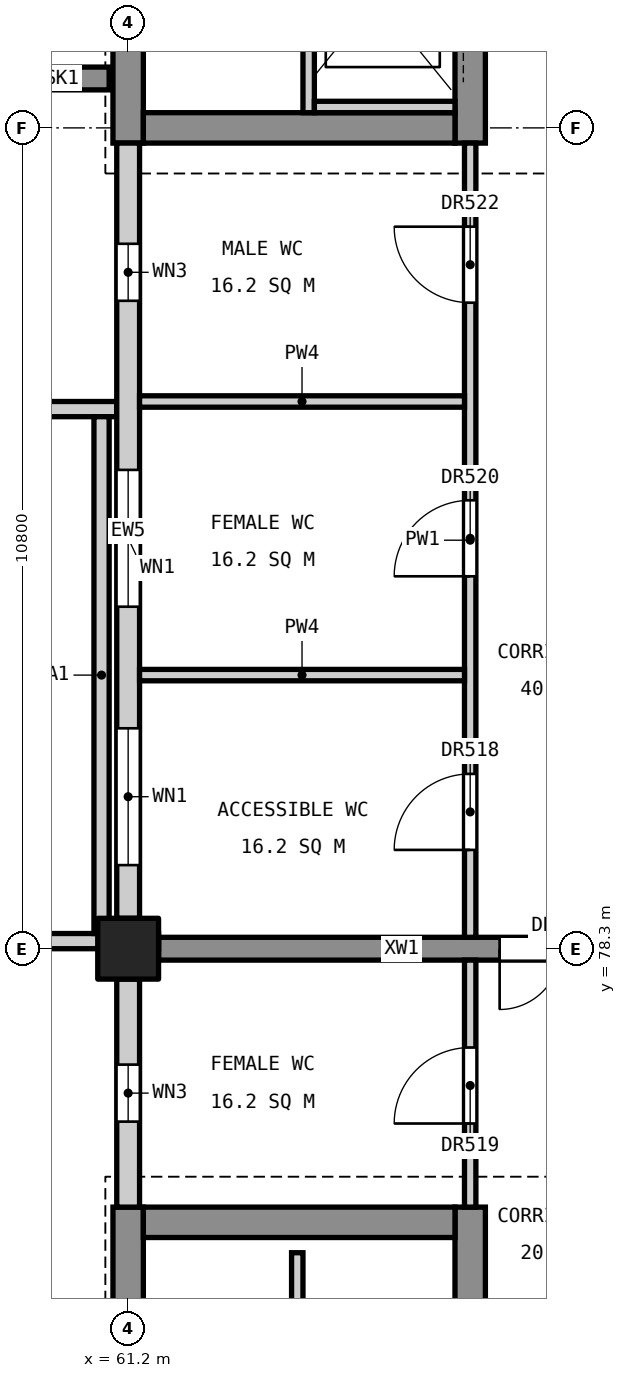
"""IFC4 building model, lengths in metres.
Left out: names, types, materials, properties, quantities, classifications, styles, units other than length and angle.
Written with IfcOpenShell. Run it as: python <this file> out.ifc"""

import sys

from ifc_helpers import new_model, si_unit, direction, frame, frame_2d, origin, origin_2d, place, context, subcontext, project, spatial, rectangle, extrude, element, fill, save


model = new_model("IFC4")
c1 = context("Model", 3, precision=1e-05, world=origin(), true_north=direction((0.0, 1.0)))
c2 = subcontext(c1, "Body", "Model", "MODEL_VIEW")
j1 = project(units=[si_unit("LENGTHUNIT", "METRE"), si_unit("PLANEANGLEUNIT", "RADIAN")], contexts=[c1])
p1 = place(None, origin())
s1 = spatial("IfcSite", under=j1, at=p1, CompositionType="ELEMENT")
p2 = place(p1, origin())
s2 = spatial("IfcBuilding", under=s1, at=p2, CompositionType="ELEMENT")
p3 = place(p2, frame((0.0, 0.0, 70.2)))
s3 = spatial("IfcBuildingStorey", under=s2, at=p3, CompositionType="ELEMENT", Elevation=70.2)
p4 = place(p3, frame((61.2, 78.3, 0.0), z_axis=(0.0, 0.0, 1.0), x_axis=(1.0, 0.0, 0.0)))
e1 = element("IfcColumn", 1, at=p4, inside=s3, PredefinedType="COLUMN", context=c2, shape_type="SweptSolid", body=[
    extrude(rectangle(XDim=0.8, YDim=0.8, at=origin_2d()), origin(), (0.0, 0.0, 1.0), 4.8),
])
p5 = place(p3, frame((61.2, 60.1, 0.0), z_axis=(0.0, 0.0, 1.0), x_axis=(0.0, 1.0, 0.0)))
e2 = element("IfcWall", 2, at=p5, inside=s3, PredefinedType="SHEAR", context=c2, shape_type="SweptSolid", body=[
    extrude(rectangle(XDim=14.8, YDim=0.4, at=frame_2d((7.4, 0.0))), origin(), (0.0, 0.0, 1.0), 4.55),
])
p6 = place(p5, frame((6.11, 0.0, 3.4)))
e3 = element("IfcOpeningElement", 3, at=p6, cuts=e2, PredefinedType="OPENING", context=c2, shape_type="SweptSolid", body=[
    extrude(rectangle(XDim=1.2, YDim=0.9, at=frame_2d((0.6, 0.45))), frame((0.0, 0.21, 0.0), z_axis=(0.0, -1.0, 0.0), x_axis=(1.0, 0.0, 0.0)), (0.0, 0.0, 1.0), 0.42),
])
p7 = place(p3, frame((65.7, 60.1, 0.0), z_axis=(0.0, 0.0, 1.0), x_axis=(0.0, 1.0, 0.0)))
e4 = element("IfcWall", 4, at=p7, inside=s3, PredefinedType="SHEAR", context=c2, shape_type="SweptSolid", body=[
    extrude(rectangle(XDim=14.8, YDim=0.4, at=frame_2d((7.4, 0.0))), origin(), (0.0, 0.0, 1.0), 4.55),
])
p8 = place(p7, frame((0.5, 0.0, 0.0)))
e5 = element("IfcOpeningElement", 5, at=p8, cuts=e4, PredefinedType="OPENING", context=c2, shape_type="SweptSolid", body=[
    extrude(rectangle(XDim=1.4, YDim=2.1, at=frame_2d((0.7, 1.05))), frame((0.0, 0.21, 0.0), z_axis=(0.0, -1.0, 0.0), x_axis=(1.0, 0.0, 0.0)), (0.0, 0.0, 1.0), 0.42),
])
p9 = place(p7, frame((8.8, 0.0, 0.0)))
e6 = element("IfcOpeningElement", 6, at=p9, cuts=e4, PredefinedType="OPENING", context=c2, shape_type="SweptSolid", body=[
    extrude(rectangle(XDim=1.1, YDim=2.1, at=frame_2d((0.55, 1.05))), frame((0.0, 0.21, 0.0), z_axis=(0.0, -1.0, 0.0), x_axis=(1.0, 0.0, 0.0)), (0.0, 0.0, 1.0), 0.42),
])
p10 = place(p7, frame((11.35, 0.0, 0.0)))
e7 = element("IfcOpeningElement", 7, at=p10, cuts=e4, PredefinedType="OPENING", context=c2, shape_type="SweptSolid", body=[
    extrude(rectangle(XDim=1.1, YDim=2.1, at=frame_2d((0.55, 1.05))), frame((0.0, 0.21, 0.0), z_axis=(0.0, -1.0, 0.0), x_axis=(1.0, 0.0, 0.0)), (0.0, 0.0, 1.0), 0.42),
])
p11 = place(p3, frame((61.4, 74.7, 0.0), z_axis=(0.0, 0.0, 1.0), x_axis=(1.0, 0.0, 0.0)))
e8 = element("IfcWall", 8, at=p11, inside=s3, PredefinedType="SHEAR", context=c2, shape_type="SweptSolid", body=[
    extrude(rectangle(XDim=4.1, YDim=0.4, at=frame_2d((2.05, 0.0))), origin(), (0.0, 0.0, 1.0), 4.55),
])
p12 = place(p3, frame((61.2, 88.9, 0.0), z_axis=(0.0, 0.0, 1.0), x_axis=(0.0, 1.0, 0.0)))
e9 = element("IfcWall", 9, at=p12, inside=s3, PredefinedType="SHEAR", context=c2, shape_type="SweptSolid", body=[
    extrude(rectangle(XDim=11.2, YDim=0.4, at=frame_2d((5.6, 0.0))), origin(), (0.0, 0.0, 1.0), 4.55),
])
p13 = place(p12, frame((3.89, 0.0, 3.4)))
e10 = element("IfcOpeningElement", 10, at=p13, cuts=e9, PredefinedType="OPENING", context=c2, shape_type="SweptSolid", body=[
    extrude(rectangle(XDim=1.2, YDim=0.9, at=frame_2d((0.6, 0.45))), frame((0.0, 0.21, 0.0), z_axis=(0.0, -1.0, 0.0), x_axis=(1.0, 0.0, 0.0)), (0.0, 0.0, 1.0), 0.42),
])
p14 = place(p3, frame((65.7, 88.9, 0.0), z_axis=(0.0, 0.0, 1.0), x_axis=(0.0, 1.0, 0.0)))
e11 = element("IfcWall", 11, at=p14, inside=s3, PredefinedType="SHEAR", context=c2, shape_type="SweptSolid", body=[
    extrude(rectangle(XDim=11.2, YDim=0.4, at=frame_2d((5.6, 0.0))), origin(), (0.0, 0.0, 1.0), 4.55),
])
p15 = place(p14, frame((9.3, 0.0, 0.0)))
e12 = element("IfcOpeningElement", 12, at=p15, cuts=e11, PredefinedType="OPENING", context=c2, shape_type="SweptSolid", body=[
    extrude(rectangle(XDim=1.4, YDim=2.1, at=frame_2d((0.7, 1.05))), frame((0.0, 0.21, 0.0), z_axis=(0.0, -1.0, 0.0), x_axis=(1.0, 0.0, 0.0)), (0.0, 0.0, 1.0), 0.42),
])
p16 = place(p14, frame((1.35, 0.0, 0.0)))
e13 = element("IfcOpeningElement", 13, at=p16, cuts=e11, PredefinedType="OPENING", context=c2, shape_type="SweptSolid", body=[
    extrude(rectangle(XDim=1.1, YDim=2.1, at=frame_2d((0.55, 1.05))), frame((0.0, 0.21, 0.0), z_axis=(0.0, -1.0, 0.0), x_axis=(1.0, 0.0, 0.0)), (0.0, 0.0, 1.0), 0.42),
])
p17 = place(p3, frame((61.4, 89.1, 0.0), z_axis=(0.0, 0.0, 1.0), x_axis=(1.0, 0.0, 0.0)))
e14 = element("IfcWall", 14, at=p17, inside=s3, PredefinedType="SHEAR", context=c2, shape_type="SweptSolid", body=[
    extrude(rectangle(XDim=4.1, YDim=0.4, at=frame_2d((2.05, 0.0))), origin(), (0.0, 0.0, 1.0), 4.55),
])
p18 = place(p3, frame((60.95, 89.75, 0.0), z_axis=(0.0, 0.0, 1.0), x_axis=(-1.0, 0.0, 0.0)))
e15 = element("IfcWall", 15, at=p18, inside=s3, PredefinedType="SHEAR", context=c2, shape_type="SweptSolid", body=[
    extrude(rectangle(XDim=1.25, YDim=0.3, at=frame_2d((0.625, 0.0))), origin(), (0.0, 0.0, 1.0), 4.8),
])
p19 = place(p3, frame((61.6, 78.3, 0.0), z_axis=(0.0, 0.0, 1.0), x_axis=(1.0, 0.0, 0.0)))
e16 = element("IfcWall", 16, at=p19, inside=s3, PredefinedType="SHEAR", context=c2, shape_type="SweptSolid", body=[
    extrude(rectangle(XDim=6.4, YDim=0.3, at=frame_2d((3.2, 0.0))), origin(), (0.0, 0.0, 1.0), 4.55),
])
p20 = place(p19, frame((4.488, 0.0, 0.0)))
e17 = element("IfcOpeningElement", 17, at=p20, cuts=e16, PredefinedType="OPENING", context=c2, shape_type="SweptSolid", body=[
    extrude(rectangle(XDim=1.6, YDim=2.1, at=frame_2d((0.8, 1.05))), frame((0.0, 0.16, 0.0), z_axis=(0.0, -1.0, 0.0), x_axis=(1.0, 0.0, 0.0)), (0.0, 0.0, 1.0), 0.32),
])
p21 = place(p3, frame((63.575, 92.0, 0.0), z_axis=(0.0, 0.0, 1.0), x_axis=(0.0, -1.0, 0.0)))
e18 = element("IfcWall", 18, at=p21, inside=s3, PredefinedType="SOLIDWALL", context=c2, shape_type="SweptSolid", body=[
    extrude(rectangle(XDim=2.7, YDim=0.15, at=frame_2d((1.35, 0.0))), origin(), (0.0, 0.0, 1.0), 4.55),
])
p22 = place(p3, frame((63.65, 89.375, 0.0), z_axis=(0.0, 0.0, 1.0), x_axis=(1.0, 0.0, 0.0)))
e19 = element("IfcWall", 19, at=p22, inside=s3, PredefinedType="SOLIDWALL", context=c2, shape_type="SweptSolid", body=[
    extrude(rectangle(XDim=1.85, YDim=0.15, at=frame_2d((0.925, 0.0))), origin(), (0.0, 0.0, 1.0), 4.55),
])
p23 = place(p3, frame((63.425, 73.3, 0.0), z_axis=(0.0, 0.0, 1.0), x_axis=(0.0, 1.0, 0.0)))
e20 = element("IfcWall", 20, at=p23, inside=s3, PredefinedType="SOLIDWALL", context=c2, shape_type="SweptSolid", body=[
    extrude(rectangle(XDim=1.0, YDim=0.15, at=frame_2d((0.5, 0.0))), origin(), (0.0, 0.0, 1.0), 4.55),
])
p24 = place(p3, frame((61.6, 78.4, 0.0), z_axis=(0.0, 0.0, 1.0), x_axis=(-1.0, 0.0, 0.0)))
e21 = element("IfcWall", 21, at=p24, inside=s3, PredefinedType="PARAPET", context=c2, shape_type="SweptSolid", body=[
    extrude(rectangle(XDim=5.2, YDim=0.2, at=frame_2d((2.6, 0.0))), origin(), (0.0, 0.0, 1.0), 1.2),
])
p25 = place(p3, frame((56.4, 85.4, 0.0), z_axis=(0.0, 0.0, 1.0), x_axis=(1.0, 0.0, 0.0)))
e22 = element("IfcWall", 22, at=p25, inside=s3, PredefinedType="PARAPET", context=c2, shape_type="SweptSolid", body=[
    extrude(rectangle(XDim=4.65, YDim=0.2, at=frame_2d((2.325, 0.0))), origin(), (0.0, 0.0, 1.0), 1.2),
])
p26 = place(p3, frame((60.85, 85.3, 0.0), z_axis=(0.0, 0.0, 1.0), x_axis=(0.0, -1.0, 0.0)))
e23 = element("IfcWall", 23, at=p26, inside=s3, PredefinedType="PARAPET", context=c2, shape_type="SweptSolid", body=[
    extrude(rectangle(XDim=6.8, YDim=0.2, at=frame_2d((3.4, 0.0))), origin(), (0.0, 0.0, 1.0), 1.2),
])
p27 = place(p3, frame((61.2, 74.9, 0.0), z_axis=(0.0, 0.0, 1.0), x_axis=(0.0, 1.0, 0.0)))
e24 = element("IfcWall", 24, at=p27, inside=s3, PredefinedType="STANDARD", context=c2, shape_type="SweptSolid", body=[
    extrude(rectangle(XDim=3.0, YDim=0.3, at=frame_2d((1.5, 0.0))), origin(), (0.0, 0.0, 1.0), 3.65),
])
p28 = place(p27, frame((1.125, 0.0, 0.8)))
e25 = element("IfcOpeningElement", 25, at=p28, cuts=e24, PredefinedType="OPENING", context=c2, shape_type="SweptSolid", body=[
    extrude(rectangle(XDim=0.75, YDim=1.2, at=frame_2d((0.375, 0.6))), frame((0.0, 0.16, 0.0), z_axis=(0.0, -1.0, 0.0), x_axis=(1.0, 0.0, 0.0)), (0.0, 0.0, 1.0), 0.32),
])
p29 = place(p3, frame((61.2, 78.7, 0.0), z_axis=(0.0, 0.0, 1.0), x_axis=(0.0, 1.0, 0.0)))
e26 = element("IfcWall", 26, at=p29, inside=s3, PredefinedType="STANDARD", context=c2, shape_type="SweptSolid", body=[
    extrude(rectangle(XDim=10.2, YDim=0.3, at=frame_2d((5.1, 0.0))), origin(), (0.0, 0.0, 1.0), 3.65),
])
p30 = place(p29, frame((0.7, 0.0, 0.9)))
e27 = element("IfcOpeningElement", 27, at=p30, cuts=e26, PredefinedType="OPENING", context=c2, shape_type="SweptSolid", body=[
    extrude(rectangle(XDim=1.8, YDim=2.4, at=frame_2d((0.9, 1.2))), frame((0.0, 0.16, 0.0), z_axis=(0.0, -1.0, 0.0), x_axis=(1.0, 0.0, 0.0)), (0.0, 0.0, 1.0), 0.32),
])
p31 = place(p29, frame((4.1, 0.0, 0.9)))
e28 = element("IfcOpeningElement", 28, at=p31, cuts=e26, PredefinedType="OPENING", context=c2, shape_type="SweptSolid", body=[
    extrude(rectangle(XDim=1.8, YDim=2.4, at=frame_2d((0.9, 1.2))), frame((0.0, 0.16, 0.0), z_axis=(0.0, -1.0, 0.0), x_axis=(1.0, 0.0, 0.0)), (0.0, 0.0, 1.0), 0.32),
])
p32 = place(p29, frame((8.125, 0.0, 0.8)))
e29 = element("IfcOpeningElement", 29, at=p32, cuts=e26, PredefinedType="OPENING", context=c2, shape_type="SweptSolid", body=[
    extrude(rectangle(XDim=0.75, YDim=1.2, at=frame_2d((0.375, 0.6))), frame((0.0, 0.16, 0.0), z_axis=(0.0, -1.0, 0.0), x_axis=(1.0, 0.0, 0.0)), (0.0, 0.0, 1.0), 0.32),
])
p33 = place(p3, frame((65.7, 74.9, 0.0), z_axis=(0.0, 0.0, 1.0), x_axis=(0.0, 1.0, 0.0)))
e30 = element("IfcWall", 30, at=p33, inside=s3, PredefinedType="PARTITIONING", context=c2, shape_type="SweptSolid", body=[
    extrude(rectangle(XDim=3.25, YDim=0.15, at=frame_2d((1.625, 0.0))), origin(), (0.0, 0.0, 1.0), 3.55),
])
p34 = place(p33, frame((1.1, 0.0, 0.0)))
e31 = element("IfcOpeningElement", 31, at=p34, cuts=e30, PredefinedType="OPENING", context=c2, shape_type="SweptSolid", body=[
    extrude(rectangle(XDim=1.0, YDim=2.1, at=frame_2d((0.5, 1.05))), frame((0.0, 0.085, 0.0), z_axis=(0.0, -1.0, 0.0), x_axis=(1.0, 0.0, 0.0)), (0.0, 0.0, 1.0), 0.17),
])
p35 = place(p3, frame((65.7, 78.45, 0.0), z_axis=(0.0, 0.0, 1.0), x_axis=(0.0, 1.0, 0.0)))
e32 = element("IfcWall", 32, at=p35, inside=s3, PredefinedType="PARTITIONING", context=c2, shape_type="SweptSolid", body=[
    extrude(rectangle(XDim=10.45, YDim=0.15, at=frame_2d((5.225, 0.0))), origin(), (0.0, 0.0, 1.0), 3.55),
])
p36 = place(p35, frame((1.15, 0.0, 0.0)))
e33 = element("IfcOpeningElement", 33, at=p36, cuts=e32, PredefinedType="OPENING", context=c2, shape_type="SweptSolid", body=[
    extrude(rectangle(XDim=1.0, YDim=2.1, at=frame_2d((0.5, 1.05))), frame((0.0, 0.085, 0.0), z_axis=(0.0, -1.0, 0.0), x_axis=(1.0, 0.0, 0.0)), (0.0, 0.0, 1.0), 0.17),
])
p37 = place(p35, frame((4.75, 0.0, 0.0)))
e34 = element("IfcOpeningElement", 34, at=p37, cuts=e32, PredefinedType="OPENING", context=c2, shape_type="SweptSolid", body=[
    extrude(rectangle(XDim=1.0, YDim=2.1, at=frame_2d((0.5, 1.05))), frame((0.0, 0.085, 0.0), z_axis=(0.0, -1.0, 0.0), x_axis=(1.0, 0.0, 0.0)), (0.0, 0.0, 1.0), 0.17),
])
p38 = place(p35, frame((8.35, 0.0, 0.0)))
e35 = element("IfcOpeningElement", 35, at=p38, cuts=e32, PredefinedType="OPENING", context=c2, shape_type="SweptSolid", body=[
    extrude(rectangle(XDim=1.0, YDim=2.1, at=frame_2d((0.5, 1.05))), frame((0.0, 0.085, 0.0), z_axis=(0.0, -1.0, 0.0), x_axis=(1.0, 0.0, 0.0)), (0.0, 0.0, 1.0), 0.17),
])
for number, where, z_axis, x_axis in (
    (36, (61.35, 81.9, 0.0), (0.0, 0.0, 1.0), (1.0, 0.0, 0.0)),
    (37, (61.35, 85.5, 0.0), (0.0, 0.0, 1.0), (1.0, 0.0, 0.0)),
):
    element("IfcWall", number, at=place(p3, frame(where, z_axis=z_axis, x_axis=x_axis)), inside=s3, PredefinedType="PARTITIONING", context=c2, shape_type="SweptSolid", body=[
        extrude(rectangle(XDim=4.275, YDim=0.15, at=frame_2d((2.137, 0.0))), origin(), (0.0, 0.0, 1.0), 3.85),
    ])
p39 = place(p28, origin())
e38 = element("IfcWindow", 38, at=p39, inside=s3, PartitioningType="SINGLE_PANEL", PredefinedType="WINDOW", context=c2, shape_type="SweptSolid", body=[
    extrude(rectangle(XDim=0.75, YDim=1.2, at=frame_2d((0.375, 0.6))), frame((0.0, 0.03, 0.0), z_axis=(0.0, -1.0, 0.0), x_axis=(1.0, 0.0, 0.0)), (0.0, 0.0, 1.0), 0.06),
])
fill(e25, e38)
p40 = place(p30, origin())
e39 = element("IfcWindow", 39, at=p40, inside=s3, PartitioningType="SINGLE_PANEL", PredefinedType="WINDOW", context=c2, shape_type="SweptSolid", body=[
    extrude(rectangle(XDim=1.8, YDim=2.4, at=frame_2d((0.9, 1.2))), frame((0.0, 0.03, 0.0), z_axis=(0.0, -1.0, 0.0), x_axis=(1.0, 0.0, 0.0)), (0.0, 0.0, 1.0), 0.06),
])
fill(e27, e39)
p41 = place(p31, origin())
e40 = element("IfcWindow", 40, at=p41, inside=s3, PartitioningType="SINGLE_PANEL", PredefinedType="WINDOW", context=c2, shape_type="SweptSolid", body=[
    extrude(rectangle(XDim=1.8, YDim=2.4, at=frame_2d((0.9, 1.2))), frame((0.0, 0.03, 0.0), z_axis=(0.0, -1.0, 0.0), x_axis=(1.0, 0.0, 0.0)), (0.0, 0.0, 1.0), 0.06),
])
fill(e28, e40)
p42 = place(p32, origin())
e41 = element("IfcWindow", 41, at=p42, inside=s3, PartitioningType="SINGLE_PANEL", PredefinedType="WINDOW", context=c2, shape_type="SweptSolid", body=[
    extrude(rectangle(XDim=0.75, YDim=1.2, at=frame_2d((0.375, 0.6))), frame((0.0, 0.03, 0.0), z_axis=(0.0, -1.0, 0.0), x_axis=(1.0, 0.0, 0.0)), (0.0, 0.0, 1.0), 0.06),
])
fill(e29, e41)
p43 = place(p36, origin())
e42 = element("IfcDoor", 42, at=p43, inside=s3, OperationType="SINGLE_SWING_LEFT", PredefinedType="DOOR", context=c2, shape_type="SweptSolid", body=[
    extrude(rectangle(XDim=1.0, YDim=2.1, at=frame_2d((0.5, 1.05))), frame((0.0, 0.025, 0.0), z_axis=(0.0, -1.0, 0.0), x_axis=(1.0, 0.0, 0.0)), (0.0, 0.0, 1.0), 0.05),
])
fill(e33, e42)
p44 = place(p34, origin())
e43 = element("IfcDoor", 43, at=p44, inside=s3, OperationType="SINGLE_SWING_LEFT", PredefinedType="DOOR", context=c2, shape_type="SweptSolid", body=[
    extrude(rectangle(XDim=1.0, YDim=2.1, at=frame_2d((0.5, 1.05))), frame((0.0, 0.025, 0.0), z_axis=(0.0, -1.0, 0.0), x_axis=(1.0, 0.0, 0.0)), (0.0, 0.0, 1.0), 0.05),
])
fill(e31, e43)
p45 = place(p37, origin())
e44 = element("IfcDoor", 44, at=p45, inside=s3, OperationType="SINGLE_SWING_LEFT", PredefinedType="DOOR", context=c2, shape_type="SweptSolid", body=[
    extrude(rectangle(XDim=1.0, YDim=2.1, at=frame_2d((0.5, 1.05))), frame((0.0, 0.025, 0.0), z_axis=(0.0, -1.0, 0.0), x_axis=(1.0, 0.0, 0.0)), (0.0, 0.0, 1.0), 0.05),
])
fill(e34, e44)
p46 = place(p38, origin())
e45 = element("IfcDoor", 45, at=p46, inside=s3, OperationType="SINGLE_SWING_RIGHT", PredefinedType="DOOR", context=c2, shape_type="SweptSolid", body=[
    extrude(rectangle(XDim=1.0, YDim=2.1, at=frame_2d((0.5, 1.05))), frame((0.0, 0.025, 0.0), z_axis=(0.0, -1.0, 0.0), x_axis=(1.0, 0.0, 0.0)), (0.0, 0.0, 1.0), 0.05),
])
fill(e35, e45)
p47 = place(p20, frame((1.6, 0.0, 0.0), z_axis=(0.0, 0.0, 1.0), x_axis=(-1.0, 0.0, 0.0)))
e46 = element("IfcDoor", 46, at=p47, inside=s3, OperationType="DOUBLE_DOOR_SINGLE_SWING", PredefinedType="DOOR", context=c2, shape_type="SweptSolid", body=[
    extrude(rectangle(XDim=1.6, YDim=2.1, at=frame_2d((0.8, 1.05))), frame((0.0, 0.025, 0.0), z_axis=(0.0, -1.0, 0.0), x_axis=(1.0, 0.0, 0.0)), (0.0, 0.0, 1.0), 0.05),
])
fill(e17, e46)
save(model, sys.argv[1])
